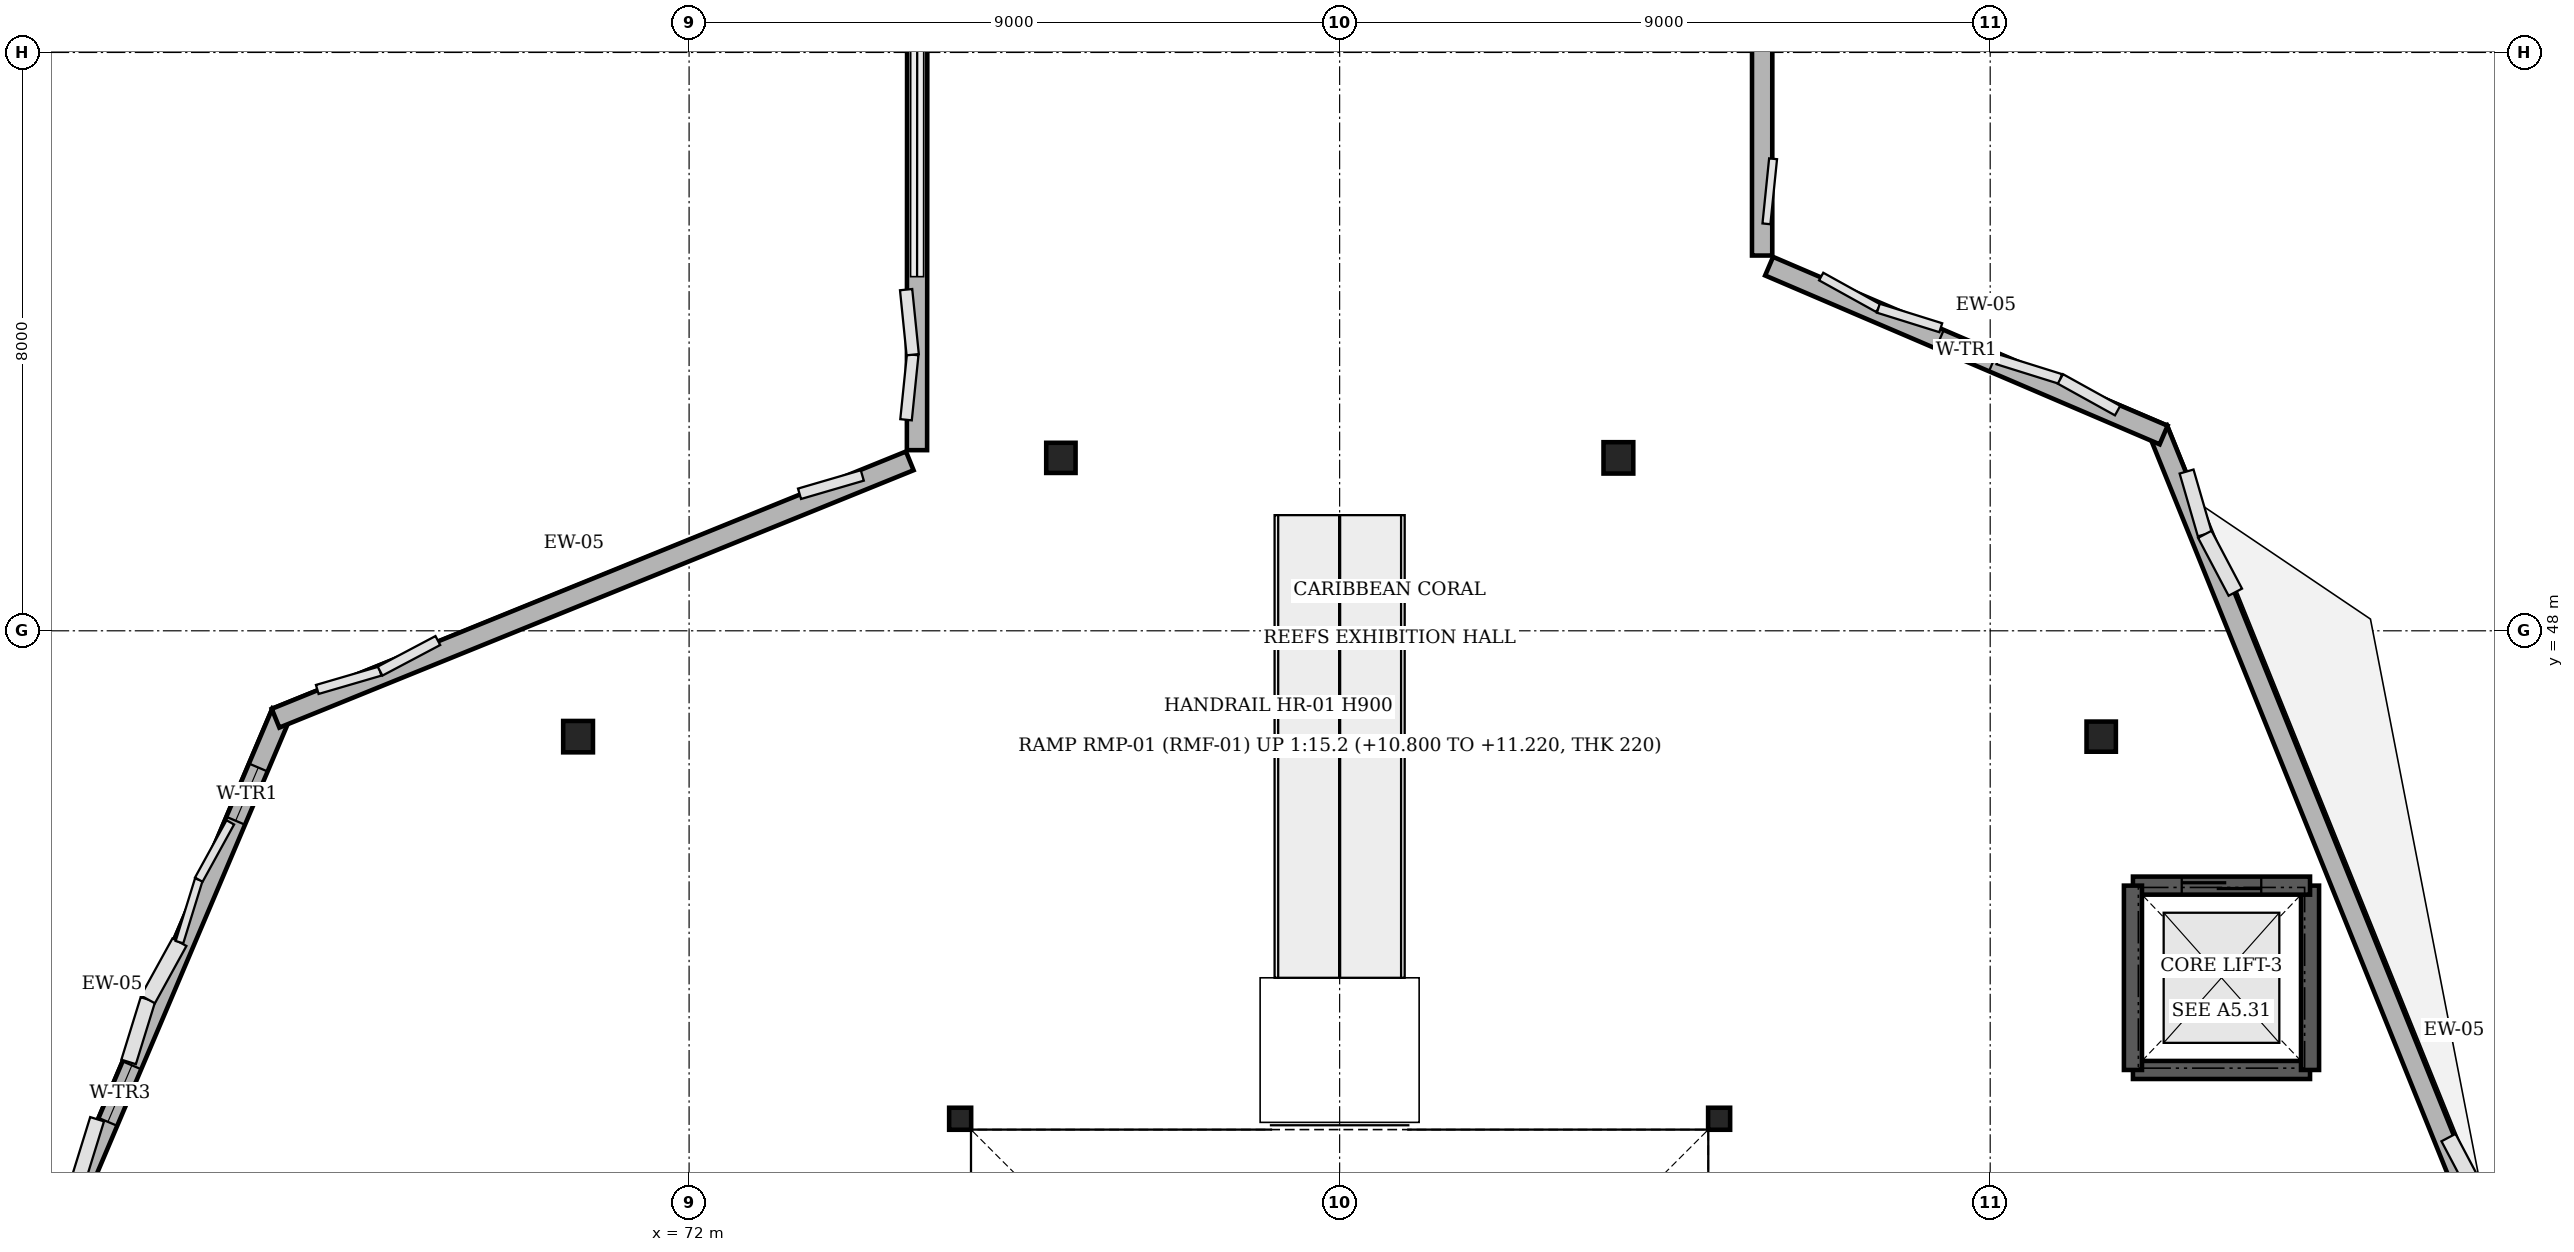
"""IFC4 building model, lengths in metres.
Left out: names, types, materials, properties, quantities, classifications, styles, units other than length and angle.
Written with IfcOpenShell. Run it as: python <this file> out.ifc"""

import sys

from ifc_helpers import new_model, si_unit, direction, frame, frame_2d, origin, origin_2d, place, context, subcontext, project, spatial, rectangle, hollow_rectangle, i_section, extrude, element, fill, save


model = new_model("IFC4")
c1 = context("Model", 3, precision=1e-05, world=origin(), true_north=direction((0.0, 1.0)))
c2 = subcontext(c1, "Body", "Model", "MODEL_VIEW")
j1 = project(units=[si_unit("LENGTHUNIT", "METRE"), si_unit("PLANEANGLEUNIT", "RADIAN")], contexts=[c1])
p1 = place(None, origin())
s1 = spatial("IfcSite", under=j1, at=p1, CompositionType="ELEMENT")
p2 = place(p1, origin())
s2 = spatial("IfcBuilding", under=s1, at=p2, CompositionType="ELEMENT")
p3 = place(p2, frame((0.0, 0.0, 10.8)))
s3 = spatial("IfcBuildingStorey", under=s2, at=p3, CompositionType="ELEMENT", Elevation=10.8)
p4 = place(p3, frame((91.536, 46.536, 0.0), z_axis=(0.0, 0.0, 1.0), x_axis=(1.0, 0.0, 0.0)))
e1 = element("IfcColumn", 1, at=p4, inside=s3, PredefinedType="COLUMN", context=c2, shape_type="SweptSolid", body=[
    extrude(i_section(OverallWidth=0.406, OverallDepth=0.417, WebThickness=0.03, FlangeThickness=0.044, FilletRadius=0.015, at=origin_2d()), origin(), (0.0, 0.0, 1.0), 4.8),
])
p5 = place(p3, frame((84.856, 50.392, 0.0), z_axis=(0.0, 0.0, 1.0), x_axis=(1.0, 0.0, 0.0)))
e2 = element("IfcColumn", 2, at=p5, inside=s3, PredefinedType="COLUMN", context=c2, shape_type="SweptSolid", body=[
    extrude(i_section(OverallWidth=0.412, OverallDepth=0.434, WebThickness=0.036, FlangeThickness=0.044, FilletRadius=0.015, at=origin_2d()), origin(), (0.0, 0.0, 1.0), 4.8),
])
p6 = place(p3, frame((77.144, 50.392, 0.0), z_axis=(0.0, 0.0, 1.0), x_axis=(1.0, 0.0, 0.0)))
e3 = element("IfcColumn", 3, at=p6, inside=s3, PredefinedType="COLUMN", context=c2, shape_type="SweptSolid", body=[
    extrude(i_section(OverallWidth=0.406, OverallDepth=0.417, WebThickness=0.03, FlangeThickness=0.044, FilletRadius=0.015, at=origin_2d()), origin(), (0.0, 0.0, 1.0), 4.8),
])
p7 = place(p3, frame((70.464, 46.536, 0.0), z_axis=(0.0, 0.0, 1.0), x_axis=(1.0, 0.0, 0.0)))
e4 = element("IfcColumn", 4, at=p7, inside=s3, PredefinedType="COLUMN", context=c2, shape_type="SweptSolid", body=[
    extrude(i_section(OverallWidth=0.412, OverallDepth=0.434, WebThickness=0.036, FlangeThickness=0.044, FilletRadius=0.015, at=origin_2d()), origin(), (0.0, 0.0, 1.0), 4.8),
])
for number, where, z_axis, x_axis in (
    (5, (86.25, 41.25, 0.0), (0.0, 0.0, 1.0), (1.0, 0.0, 0.0)),
    (6, (75.75, 41.25, 0.0), (0.0, 0.0, 1.0), (1.0, 0.0, 0.0)),
):
    element("IfcColumn", number, at=place(p3, frame(where, z_axis=z_axis, x_axis=x_axis)), inside=s3, PredefinedType="COLUMN", context=c2, shape_type="SweptSolid", body=[
        extrude(hollow_rectangle(XDim=0.305, YDim=0.305, WallThickness=0.015, InnerFilletRadius=0.015, OuterFilletRadius=0.029, at=origin_2d()), origin(), (0.0, 0.0, 1.0), 4.8),
    ])
p8 = place(p3, frame((62.94, 38.805, 0.0), z_axis=(0.0, 0.0, 1.0), x_axis=(0.390737900934, 0.920501978691, 0.0)))
e7 = element("IfcWall", 7, at=p8, inside=s3, PredefinedType="SOLIDWALL", context=c2, shape_type="SweptSolid", body=[
    extrude(rectangle(XDim=8.768, YDim=0.28, at=frame_2d((4.384, 0.0))), origin(), (0.0, 0.0, 1.0), 3.624),
])
p9 = place(p8, frame((2.609, 0.0, 1.05)))
e8 = element("IfcOpeningElement", 8, at=p9, cuts=e7, PredefinedType="OPENING", context=c2, shape_type="SweptSolid", body=[
    extrude(rectangle(XDim=0.85, YDim=1.6, at=frame_2d((0.425, 0.8))), frame((0.0, 0.15, 0.0), z_axis=(0.0, -1.0, 0.0), x_axis=(1.0, 0.0, 0.0)), (0.0, 0.0, 1.0), 0.3),
])
p10 = place(p8, frame((7.134, 0.0, 1.05)))
e9 = element("IfcOpeningElement", 9, at=p10, cuts=e7, PredefinedType="OPENING", context=c2, shape_type="SweptSolid", body=[
    extrude(rectangle(XDim=0.8, YDim=1.5, at=frame_2d((0.4, 0.75))), frame((0.0, 0.15, 0.0), z_axis=(0.0, -1.0, 0.0), x_axis=(1.0, 0.0, 0.0)), (0.0, 0.0, 1.0), 0.3),
])
p11 = place(p3, frame((66.279, 46.791, 0.0), z_axis=(0.0, 0.0, 1.0), x_axis=(0.926639271133, 0.375951674014, 0.0)))
e10 = element("IfcWall", 10, at=p11, inside=s3, PredefinedType="SOLIDWALL", context=c2, shape_type="SweptSolid", body=[
    extrude(rectangle(XDim=9.469, YDim=0.28, at=frame_2d((4.734, 0.0))), origin(), (0.0, 0.0, 1.0), 3.629),
])
p12 = place(p3, frame((75.153, 50.499, 0.0), z_axis=(0.0, 0.0, 1.0), x_axis=(0.000526745908, 0.999999861269, 0.0)))
e11 = element("IfcWall", 11, at=p12, inside=s3, PredefinedType="SOLIDWALL", context=c2, shape_type="SweptSolid", body=[
    extrude(rectangle(XDim=13.441, YDim=0.28, at=frame_2d((6.721, 0.0))), origin(), (0.0, 0.0, 1.0), 2.45),
])
p13 = place(p12, frame((11.271, 0.0, 0.6)))
e12 = element("IfcOpeningElement", 12, at=p13, cuts=e11, PredefinedType="OPENING", context=c2, shape_type="SweptSolid", body=[
    extrude(rectangle(XDim=0.8, YDim=1.7, at=frame_2d((0.4, 0.85))), frame((0.0, 0.15, 0.0), z_axis=(0.0, -1.0, 0.0), x_axis=(1.0, 0.0, 0.0)), (0.0, 0.0, 1.0), 0.3),
])
p14 = place(p3, frame((92.314, 50.795, 0.0), z_axis=(0.0, 0.0, 1.0), x_axis=(0.37460574737, -0.927184196391, 0.0)))
e13 = element("IfcWall", 13, at=p14, inside=s3, PredefinedType="SOLIDWALL", context=c2, shape_type="SweptSolid", body=[
    extrude(rectangle(XDim=18.5, YDim=0.28, at=frame_2d((9.25, 0.0))), origin(), (0.0, 0.0, 1.0), 3.629),
])
p15 = place(p14, frame((11.525, 0.0, 1.05)))
e14 = element("IfcOpeningElement", 14, at=p15, cuts=e13, PredefinedType="OPENING", context=c2, shape_type="SweptSolid", body=[
    extrude(rectangle(XDim=0.85, YDim=1.6, at=frame_2d((0.425, 0.8))), frame((0.0, 0.15, 0.0), z_axis=(0.0, -1.0, 0.0), x_axis=(1.0, 0.0, 0.0)), (0.0, 0.0, 1.0), 0.3),
])
p16 = place(p14, frame((16.05, 0.0, 1.05)))
e15 = element("IfcOpeningElement", 15, at=p16, cuts=e13, PredefinedType="OPENING", context=c2, shape_type="SweptSolid", body=[
    extrude(rectangle(XDim=0.8, YDim=1.5, at=frame_2d((0.4, 0.75))), frame((0.0, 0.15, 0.0), z_axis=(0.0, -1.0, 0.0), x_axis=(1.0, 0.0, 0.0)), (0.0, 0.0, 1.0), 0.3),
])
p17 = place(p3, frame((86.847, 63.968, 0.0), z_axis=(0.0, 0.0, 1.0), x_axis=(-0.000249190124, -0.999999968952, 0.0)))
e16 = element("IfcWall", 16, at=p17, inside=s3, PredefinedType="SOLIDWALL", context=c2, shape_type="SweptSolid", body=[
    extrude(rectangle(XDim=10.777, YDim=0.28, at=frame_2d((5.389, 0.0))), origin(), (0.0, 0.0, 1.0), 3.494),
])
p18 = place(p3, frame((86.942, 53.044, 0.0), z_axis=(0.0, 0.0, 1.0), x_axis=(0.919349113353, -0.393442763026, 0.0)))
e17 = element("IfcWall", 17, at=p18, inside=s3, PredefinedType="SOLIDWALL", context=c2, shape_type="SweptSolid", body=[
    extrude(rectangle(XDim=5.937, YDim=0.28, at=frame_2d((2.968, 0.0))), origin(), (0.0, 0.0, 1.0), 3.634),
])
p19 = place(p18, frame((2.568, 0.0, 1.05)))
e18 = element("IfcOpeningElement", 18, at=p19, cuts=e17, PredefinedType="OPENING", context=c2, shape_type="SweptSolid", body=[
    extrude(rectangle(XDim=0.8, YDim=1.5, at=frame_2d((0.4, 0.75))), frame((0.0, 0.15, 0.0), z_axis=(0.0, -1.0, 0.0), x_axis=(1.0, 0.0, 0.0)), (0.0, 0.0, 1.0), 0.3),
])
p20 = place(p3, frame((91.975, 41.925, 0.0), z_axis=(0.0, 0.0, 1.0), x_axis=(1.0, 0.0, 0.0)))
e19 = element("IfcWall", 19, at=p20, inside=s3, PredefinedType="SOLIDWALL", context=c2, shape_type="SweptSolid", body=[
    extrude(rectangle(XDim=2.45, YDim=0.25, at=frame_2d((1.225, 0.0))), origin(), (0.0, 0.0, 1.0), 4.8),
])
p21 = place(p3, frame((94.425, 41.925, 0.0), z_axis=(0.0, 0.0, 1.0), x_axis=(0.0, 1.0, 0.0)))
e20 = element("IfcWall", 20, at=p21, inside=s3, PredefinedType="SOLIDWALL", context=c2, shape_type="SweptSolid", body=[
    extrude(rectangle(XDim=2.55, YDim=0.25, at=frame_2d((1.275, 0.0))), origin(), (0.0, 0.0, 1.0), 4.8),
])
p22 = place(p3, frame((94.425, 44.475, 0.0), z_axis=(0.0, 0.0, 1.0), x_axis=(-1.0, 0.0, 0.0)))
e21 = element("IfcWall", 21, at=p22, inside=s3, PredefinedType="SOLIDWALL", context=c2, shape_type="SweptSolid", body=[
    extrude(rectangle(XDim=2.45, YDim=0.25, at=frame_2d((1.225, 0.0))), origin(), (0.0, 0.0, 1.0), 4.8),
])
p23 = place(p22, frame((0.675, 0.0, 0.0)))
e22 = element("IfcOpeningElement", 22, at=p23, cuts=e21, PredefinedType="OPENING", context=c2, shape_type="SweptSolid", body=[
    extrude(rectangle(XDim=1.1, YDim=2.2, at=frame_2d((0.55, 1.1))), frame((0.0, 0.135, 0.0), z_axis=(0.0, -1.0, 0.0), x_axis=(1.0, 0.0, 0.0)), (0.0, 0.0, 1.0), 0.27),
])
p24 = place(p3, frame((91.975, 44.475, 0.0), z_axis=(0.0, 0.0, 1.0), x_axis=(0.0, -1.0, 0.0)))
e23 = element("IfcWall", 23, at=p24, inside=s3, PredefinedType="SOLIDWALL", context=c2, shape_type="SweptSolid", body=[
    extrude(rectangle(XDim=2.55, YDim=0.25, at=frame_2d((1.275, 0.0))), origin(), (0.0, 0.0, 1.0), 4.8),
])
p25 = place(p9, origin())
e24 = element("IfcWindow", 24, at=p25, inside=s3, PartitioningType="SINGLE_PANEL", PredefinedType="WINDOW", context=c2, shape_type="SweptSolid", body=[
    extrude(rectangle(XDim=0.85, YDim=1.6, at=frame_2d((0.425, 0.8))), frame((0.0, 0.03, 0.0), z_axis=(0.0, -1.0, 0.0), x_axis=(1.0, 0.0, 0.0)), (0.0, 0.0, 1.0), 0.06),
])
fill(e8, e24)
p26 = place(p10, origin())
e25 = element("IfcWindow", 25, at=p26, inside=s3, PartitioningType="SINGLE_PANEL", PredefinedType="WINDOW", context=c2, shape_type="SweptSolid", body=[
    extrude(rectangle(XDim=0.8, YDim=1.5, at=frame_2d((0.4, 0.75))), frame((0.0, 0.03, 0.0), z_axis=(0.0, -1.0, 0.0), x_axis=(1.0, 0.0, 0.0)), (0.0, 0.0, 1.0), 0.06),
])
fill(e9, e25)
p27 = place(p19, origin())
e26 = element("IfcWindow", 26, at=p27, inside=s3, PartitioningType="SINGLE_PANEL", PredefinedType="WINDOW", context=c2, shape_type="SweptSolid", body=[
    extrude(rectangle(XDim=0.8, YDim=1.5, at=frame_2d((0.4, 0.75))), frame((0.0, 0.03, 0.0), z_axis=(0.0, -1.0, 0.0), x_axis=(1.0, 0.0, 0.0)), (0.0, 0.0, 1.0), 0.06),
])
fill(e18, e26)
p28 = place(p23, origin())
e27 = element("IfcDoor", 27, at=p28, inside=s3, OperationType="SLIDING_TO_LEFT", PredefinedType="DOOR", context=c2, shape_type="SweptSolid", body=[
    extrude(rectangle(XDim=1.1, YDim=2.2, at=frame_2d((0.55, 1.1))), frame((0.0, 0.025, 0.0), z_axis=(0.0, -1.0, 0.0), x_axis=(1.0, 0.0, 0.0)), (0.0, 0.0, 1.0), 0.05),
])
fill(e22, e27)
save(model, sys.argv[1])
